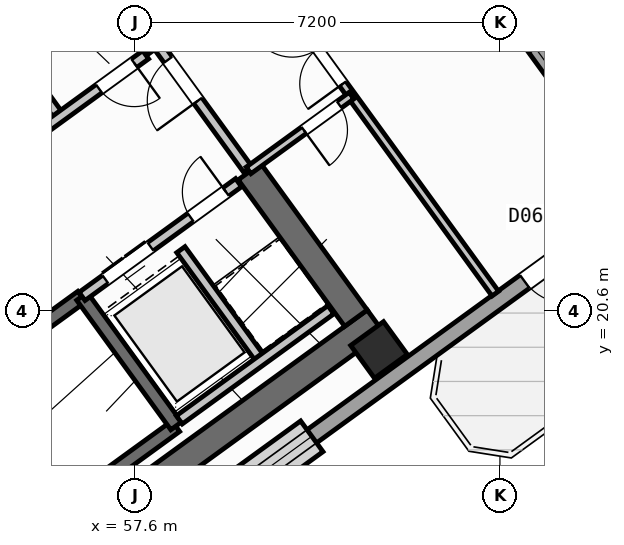
"""IFC4 building model, lengths in metres.
Left out: names, types, materials, properties, quantities, classifications, styles, units other than length and angle.
Written with IfcOpenShell. Run it as: python <this file> out.ifc"""

import sys

from ifc_helpers import new_model, si_unit, direction, frame, frame_2d, origin, origin_2d, place, context, subcontext, project, spatial, rectangle, hollow_rectangle, extrude, source, transform, mapped, element, fill, save


model = new_model("IFC4")
c1 = context("Model", 3, precision=1e-05, world=origin(), true_north=direction((0.0, 1.0)))
c2 = subcontext(c1, "Body", "Model", "MODEL_VIEW")
j1 = project(units=[si_unit("LENGTHUNIT", "METRE"), si_unit("PLANEANGLEUNIT", "RADIAN")], contexts=[c1])
p1 = place(None, origin())
s1 = spatial("IfcSite", under=j1, at=p1, CompositionType="ELEMENT")
p2 = place(p1, origin())
s2 = spatial("IfcBuilding", under=s1, at=p2, CompositionType="ELEMENT")
p3 = place(p2, frame((0.0, 0.0, 195.0)))
s3 = spatial("IfcBuildingStorey", under=s2, at=p3, CompositionType="ELEMENT", Elevation=195.0)
p4 = place(p3, frame((52.359, 13.14, 0.0), z_axis=(0.0, 0.0, 1.0), x_axis=(0.809014896919, 0.587788139183, 0.0)))
e1 = element("IfcWall", 1, at=p4, inside=s3, PredefinedType="SHEAR", context=c2, shape_type="SweptSolid", body=[
    extrude(rectangle(XDim=12.34, YDim=0.55, at=frame_2d((6.17, 0.0))), origin(), (0.0, 0.0, 1.0), 4.22),
])
p5 = place(p3, frame((61.958, 20.454, 0.0), z_axis=(0.0, 0.0, 1.0), x_axis=(-0.587802113096, 0.809004744015, 0.0)))
e2 = element("IfcWall", 2, at=p5, inside=s3, PredefinedType="SHEAR", context=c2, shape_type="SweptSolid", body=[
    extrude(rectangle(XDim=3.575, YDim=0.55, at=frame_2d((1.788, 0.0))), origin(), (0.0, 0.0, 1.0), 4.22),
])
p6 = place(p3, frame((58.064, 25.813, 0.0), z_axis=(0.0, 0.0, 1.0), x_axis=(-0.587764933797, 0.809031756236, 0.0)))
e3 = element("IfcWall", 3, at=p6, inside=s3, PredefinedType="SHEAR", context=c2, shape_type="SweptSolid", body=[
    extrude(rectangle(XDim=6.425, YDim=0.55, at=frame_2d((3.212, 0.0))), origin(), (0.0, 0.0, 1.0), 4.22),
])
m1 = source(origin(), c2, "Body", "SweptSolid", [
    extrude(hollow_rectangle(XDim=0.8, YDim=0.8, WallThickness=0.032, at=origin_2d()), origin(), (0.0, 0.0, 1.0), 4.5),
])
p7 = place(p3, frame((62.414, 19.827, 0.0), z_axis=(0.0, 0.0, 1.0), x_axis=(0.809016994375, 0.587785252292, 0.0)))
e4 = element("IfcColumn", 4, at=p7, inside=s3, PredefinedType="COLUMN", context=c2, shape_type="MappedRepresentation", body=[
    mapped(m1, transform((0.0, 0.0, 0.0), scale=1.0)),
])
p8 = place(p3, frame((54.81, 40.5, 0.0), z_axis=(0.0, 0.0, 1.0), x_axis=(0.587783625747, -0.809018176127, 0.0)))
e5 = element("IfcWall", 5, at=p8, inside=s3, PredefinedType="STANDARD", context=c2, shape_type="SweptSolid", body=[
    extrude(rectangle(XDim=21.587, YDim=0.32, at=frame_2d((10.794, 0.0))), origin(), (0.0, 0.0, 1.0), 3.695),
])
p9 = place(p8, frame((2.131, 0.0, 0.7)))
e6 = element("IfcOpeningElement", 6, at=p9, cuts=e5, PredefinedType="OPENING", context=c2, shape_type="SweptSolid", body=[
    extrude(rectangle(XDim=2.6, YDim=2.0, at=frame_2d((1.3, 1.0))), frame((0.0, 0.17, 0.0), z_axis=(0.0, -1.0, 0.0), x_axis=(1.0, 0.0, 0.0)), (0.0, 0.0, 1.0), 0.34),
])
p10 = place(p8, frame((9.244, 0.0, 0.75)))
e7 = element("IfcOpeningElement", 7, at=p10, cuts=e5, PredefinedType="OPENING", context=c2, shape_type="SweptSolid", body=[
    extrude(rectangle(XDim=2.0, YDim=1.95, at=frame_2d((1.0, 0.975))), frame((0.0, 0.17, 0.0), z_axis=(0.0, -1.0, 0.0), x_axis=(1.0, 0.0, 0.0)), (0.0, 0.0, 1.0), 0.34),
])
p11 = place(p8, frame((15.294, 0.0, 0.85)))
e8 = element("IfcOpeningElement", 8, at=p11, cuts=e5, PredefinedType="OPENING", context=c2, shape_type="SweptSolid", body=[
    extrude(rectangle(XDim=1.6, YDim=1.8, at=frame_2d((0.8, 0.9))), frame((0.0, 0.17, 0.0), z_axis=(0.0, -1.0, 0.0), x_axis=(1.0, 0.0, 0.0)), (0.0, 0.0, 1.0), 0.34),
])
p12 = place(p8, frame((18.194, 0.0, 0.85)))
e9 = element("IfcOpeningElement", 9, at=p12, cuts=e5, PredefinedType="OPENING", context=c2, shape_type="SweptSolid", body=[
    extrude(rectangle(XDim=1.6, YDim=1.8, at=frame_2d((0.8, 0.9))), frame((0.0, 0.17, 0.0), z_axis=(0.0, -1.0, 0.0), x_axis=(1.0, 0.0, 0.0)), (0.0, 0.0, 1.0), 0.34),
])
p13 = place(p3, frame((67.454, 22.747, 0.0), z_axis=(0.0, 0.0, 1.0), x_axis=(-0.809021120468, -0.587779573171, 0.0)))
e10 = element("IfcWall", 10, at=p13, inside=s3, PredefinedType="STANDARD", context=c2, shape_type="SweptSolid", body=[
    extrude(rectangle(XDim=17.588, YDim=0.32, at=frame_2d((8.794, 0.0))), origin(), (0.0, 0.0, 1.0), 4.22),
])
p14 = place(p13, frame((1.624, 0.0, 0.0)))
e11 = element("IfcOpeningElement", 11, at=p14, cuts=e10, PredefinedType="OPENING", context=c2, shape_type="SweptSolid", body=[
    extrude(rectangle(XDim=1.05, YDim=2.15, at=frame_2d((0.525, 1.075))), frame((0.0, 0.17, 0.0), z_axis=(0.0, -1.0, 0.0), x_axis=(1.0, 0.0, 0.0)), (0.0, 0.0, 1.0), 0.34),
])
p15 = place(p13, frame((7.869, 0.0, 0.7)))
e12 = element("IfcOpeningElement", 12, at=p15, cuts=e10, PredefinedType="OPENING", context=c2, shape_type="SweptSolid", body=[
    extrude(rectangle(XDim=2.6, YDim=2.0, at=frame_2d((1.3, 1.0))), frame((0.0, 0.17, 0.0), z_axis=(0.0, -1.0, 0.0), x_axis=(1.0, 0.0, 0.0)), (0.0, 0.0, 1.0), 0.34),
])
p16 = place(p13, frame((13.119, 0.0, 0.7)))
e13 = element("IfcOpeningElement", 13, at=p16, cuts=e10, PredefinedType="OPENING", context=c2, shape_type="SweptSolid", body=[
    extrude(rectangle(XDim=2.6, YDim=2.0, at=frame_2d((1.3, 1.0))), frame((0.0, 0.17, 0.0), z_axis=(0.0, -1.0, 0.0), x_axis=(1.0, 0.0, 0.0)), (0.0, 0.0, 1.0), 0.34),
])
p17 = place(p3, frame((49.863, 23.44, 0.0), z_axis=(0.0, 0.0, 1.0), x_axis=(0.809003474932, 0.587803859759, 0.0)))
e14 = element("IfcWall", 14, at=p17, inside=s3, PredefinedType="SHEAR", context=c2, shape_type="SweptSolid", body=[
    extrude(rectangle(XDim=7.46, YDim=0.26, at=frame_2d((3.73, 0.0))), origin(), (0.0, 0.0, 1.0), 4.22),
])
p18 = place(p17, frame((0.36, 0.0, 0.0)))
e15 = element("IfcOpeningElement", 15, at=p18, cuts=e14, PredefinedType="OPENING", context=c2, shape_type="SweptSolid", body=[
    extrude(rectangle(XDim=0.86, YDim=2.05, at=frame_2d((0.43, 1.025))), frame((0.0, 0.14, 0.0), z_axis=(0.0, -1.0, 0.0), x_axis=(1.0, 0.0, 0.0)), (0.0, 0.0, 1.0), 0.28),
])
p19 = place(p3, frame((52.472, 14.013, 0.0), z_axis=(0.0, 0.0, 1.0), x_axis=(0.809028366311, 0.587769599847, 0.0)))
e16 = element("IfcWall", 16, at=p19, inside=s3, PredefinedType="SHEAR", context=c2, shape_type="SweptSolid", body=[
    extrude(rectangle(XDim=7.33, YDim=0.26, at=frame_2d((3.665, 0.0))), origin(), (0.0, 0.0, 1.0), 4.22),
])
p20 = place(p3, frame((50.615, 16.57, 0.0), z_axis=(0.0, 0.0, 1.0), x_axis=(0.809028366311, 0.587769599847, 0.0)))
e17 = element("IfcWall", 17, at=p20, inside=s3, PredefinedType="SHEAR", context=c2, shape_type="SweptSolid", body=[
    extrude(rectangle(XDim=7.33, YDim=0.26, at=frame_2d((3.665, 0.0))), origin(), (0.0, 0.0, 1.0), 4.22),
])
p21 = place(p20, frame((0.22, 0.0, 0.0)))
e18 = element("IfcOpeningElement", 18, at=p21, cuts=e17, PredefinedType="OPENING", context=c2, shape_type="SweptSolid", body=[
    extrude(rectangle(XDim=1.1, YDim=2.1, at=frame_2d((0.55, 1.05))), frame((0.0, 0.14, 0.0), z_axis=(0.0, -1.0, 0.0), x_axis=(1.0, 0.0, 0.0)), (0.0, 0.0, 1.0), 0.28),
])
p22 = place(p3, frame((58.41, 18.327, 0.0), z_axis=(0.0, 0.0, 1.0), x_axis=(-0.58776738483, 0.809029975545, 0.0)))
e19 = element("IfcWall", 19, at=p22, inside=s3, PredefinedType="SHEAR", context=c2, shape_type="SweptSolid", body=[
    extrude(rectangle(XDim=3.16, YDim=0.26, at=frame_2d((1.58, 0.0))), origin(), (0.0, 0.0, 1.0), 4.22),
])
p23 = place(p3, frame((56.553, 20.884, 0.0), z_axis=(0.0, 0.0, 1.0), x_axis=(0.809023564264, 0.58777620951, 0.0)))
e20 = element("IfcWall", 20, at=p23, inside=s3, PredefinedType="STANDARD", context=c2, shape_type="SweptSolid", body=[
    extrude(rectangle(XDim=3.818, YDim=0.2, at=frame_2d((1.909, 0.0))), origin(), (0.0, 0.0, 1.0), 4.21),
])
p24 = place(p23, frame((0.57, 0.0, 0.0)))
e21 = element("IfcOpeningElement", 21, at=p24, cuts=e20, PredefinedType="OPENING", context=c2, shape_type="SweptSolid", body=[
    extrude(rectangle(XDim=1.1, YDim=2.15, at=frame_2d((0.55, 1.075))), frame((0.0, 0.11, 0.0), z_axis=(0.0, -1.0, 0.0), x_axis=(1.0, 0.0, 0.0)), (0.0, 0.0, 1.0), 0.22),
])
p25 = place(p23, frame((2.65, 0.0, 0.0)))
e22 = element("IfcOpeningElement", 22, at=p25, cuts=e20, PredefinedType="OPENING", context=c2, shape_type="SweptSolid", body=[
    extrude(rectangle(XDim=0.86, YDim=2.05, at=frame_2d((0.43, 1.025))), frame((0.0, 0.11, 0.0), z_axis=(0.0, -1.0, 0.0), x_axis=(1.0, 0.0, 0.0)), (0.0, 0.0, 1.0), 0.22),
])
p26 = place(p3, frame((60.067, 19.655, 0.0), z_axis=(0.0, 0.0, 1.0), x_axis=(-0.587800520745, 0.809005900975, 0.0)))
e23 = element("IfcWall", 23, at=p26, inside=s3, PredefinedType="STANDARD", context=c2, shape_type="SweptSolid", body=[
    extrude(rectangle(XDim=2.66, YDim=0.2, at=frame_2d((1.33, 0.0))), origin(), (0.0, 0.0, 1.0), 4.21),
])
p27 = place(p3, frame((58.472, 18.447, 0.0), z_axis=(0.0, 0.0, 1.0), x_axis=(0.809018631237, 0.587782999339, 0.0)))
e24 = element("IfcWall", 24, at=p27, inside=s3, PredefinedType="STANDARD", context=c2, shape_type="SweptSolid", body=[
    extrude(rectangle(XDim=3.698, YDim=0.2, at=frame_2d((1.849, 0.0))), origin(), (0.0, 0.0, 1.0), 4.21),
])
p28 = place(p3, frame((56.111, 24.419, 0.0), z_axis=(0.0, 0.0, 1.0), x_axis=(-0.58777848983, 0.809021907548, 0.0)))
e25 = element("IfcWall", 25, at=p28, inside=s3, PredefinedType="STANDARD", context=c2, shape_type="SweptSolid", body=[
    extrude(rectangle(XDim=2.88, YDim=0.2, at=frame_2d((1.44, 0.0))), origin(), (0.0, 0.0, 1.0), 4.21),
])
p29 = place(p3, frame((53.425, 22.468, 0.0), z_axis=(0.0, 0.0, 1.0), x_axis=(0.809024377198, 0.587775090574, 0.0)))
e26 = element("IfcWall", 26, at=p29, inside=s3, PredefinedType="STANDARD", context=c2, shape_type="SweptSolid", body=[
    extrude(rectangle(XDim=5.418, YDim=0.2, at=frame_2d((2.709, 0.0))), origin(), (0.0, 0.0, 1.0), 4.21),
])
p30 = place(p29, frame((4.28, 0.0, 0.0)))
e27 = element("IfcOpeningElement", 27, at=p30, cuts=e26, PredefinedType="OPENING", context=c2, shape_type="SweptSolid", body=[
    extrude(rectangle(XDim=0.86, YDim=2.05, at=frame_2d((0.43, 1.025))), frame((0.0, 0.11, 0.0), z_axis=(0.0, -1.0, 0.0), x_axis=(1.0, 0.0, 0.0)), (0.0, 0.0, 1.0), 0.22),
])
p31 = place(p29, frame((0.35, 0.0, 0.0)))
e28 = element("IfcOpeningElement", 28, at=p31, cuts=e26, PredefinedType="OPENING", context=c2, shape_type="SweptSolid", body=[
    extrude(rectangle(XDim=0.86, YDim=2.05, at=frame_2d((0.43, 1.025))), frame((0.0, 0.11, 0.0), z_axis=(0.0, -1.0, 0.0), x_axis=(1.0, 0.0, 0.0)), (0.0, 0.0, 1.0), 0.22),
])
p32 = place(p3, frame((59.827, 23.386, 0.0), z_axis=(0.0, 0.0, 1.0), x_axis=(-0.587803840107, 0.809003489211, 0.0)))
e29 = element("IfcWall", 29, at=p32, inside=s3, PredefinedType="STANDARD", context=c2, shape_type="SweptSolid", body=[
    extrude(rectangle(XDim=2.96, YDim=0.2, at=frame_2d((1.48, 0.0))), origin(), (0.0, 0.0, 1.0), 4.21),
])
p33 = place(p32, frame((1.68, 0.0, 0.0)))
e30 = element("IfcOpeningElement", 30, at=p33, cuts=e29, PredefinedType="OPENING", context=c2, shape_type="SweptSolid", body=[
    extrude(rectangle(XDim=1.0, YDim=2.1, at=frame_2d((0.5, 1.05))), frame((0.0, 0.11, 0.0), z_axis=(0.0, -1.0, 0.0), x_axis=(1.0, 0.0, 0.0)), (0.0, 0.0, 1.0), 0.22),
])
p34 = place(p3, frame((64.709, 20.938, 0.0), z_axis=(0.0, 0.0, 1.0), x_axis=(-0.58777828151, 0.809022058899, 0.0)))
e31 = element("IfcWall", 31, at=p34, inside=s3, PredefinedType="PARTITIONING", context=c2, shape_type="SweptSolid", body=[
    extrude(rectangle(XDim=21.7, YDim=0.16, at=frame_2d((10.85, 0.0))), origin(), (0.0, 0.0, 1.0), 4.21),
])
p35 = place(p34, frame((5.12, 0.0, 0.0)))
e32 = element("IfcOpeningElement", 32, at=p35, cuts=e31, PredefinedType="OPENING", context=c2, shape_type="SweptSolid", body=[
    extrude(rectangle(XDim=1.7, YDim=2.2, at=frame_2d((0.85, 1.1))), frame((0.0, 0.09, 0.0), z_axis=(0.0, -1.0, 0.0), x_axis=(1.0, 0.0, 0.0)), (0.0, 0.0, 1.0), 0.18),
])
p36 = place(p3, frame((59.839, 23.37, 0.0), z_axis=(0.0, 0.0, 1.0), x_axis=(0.809000999347, 0.58780726693, 0.0)))
e33 = element("IfcWall", 33, at=p36, inside=s3, PredefinedType="PARTITIONING", context=c2, shape_type="SweptSolid", body=[
    extrude(rectangle(XDim=2.51, YDim=0.16, at=frame_2d((1.255, 0.0))), origin(), (0.0, 0.0, 1.0), 4.21),
])
p37 = place(p36, frame((1.35, 0.0, 0.0)))
e34 = element("IfcOpeningElement", 34, at=p37, cuts=e33, PredefinedType="OPENING", context=c2, shape_type="SweptSolid", body=[
    extrude(rectangle(XDim=0.86, YDim=2.05, at=frame_2d((0.43, 1.025))), frame((0.0, 0.09, 0.0), z_axis=(0.0, -1.0, 0.0), x_axis=(1.0, 0.0, 0.0)), (0.0, 0.0, 1.0), 0.18),
])
m2 = source(origin(), c2, "Body", "SweptSolid", [
    extrude(rectangle(XDim=1.05, YDim=2.15, at=frame_2d((0.525, 1.075))), frame((0.0, 0.025, 0.0), z_axis=(0.0, -1.0, 0.0), x_axis=(1.0, 0.0, 0.0)), (0.0, 0.0, 1.0), 0.05),
])
p38 = place(p14, origin())
e35 = element("IfcDoor", 35, at=p38, inside=s3, OperationType="SINGLE_SWING_LEFT", PredefinedType="DOOR", context=c2, shape_type="MappedRepresentation", body=[
    mapped(m2, transform((0.0, 0.0, 0.0), scale=1.0)),
])
fill(e11, e35)
m3 = source(origin(), c2, "Body", "SweptSolid", [
    extrude(rectangle(XDim=1.6, YDim=1.8, at=frame_2d((0.8, 0.9))), frame((0.0, 0.03, 0.0), z_axis=(0.0, -1.0, 0.0), x_axis=(1.0, 0.0, 0.0)), (0.0, 0.0, 1.0), 0.06),
])
p39 = place(p12, origin())
e36 = element("IfcWindow", 36, at=p39, inside=s3, PartitioningType="SINGLE_PANEL", PredefinedType="WINDOW", context=c2, shape_type="MappedRepresentation", body=[
    mapped(m3, transform((0.0, 0.0, 0.0), scale=1.0)),
])
fill(e9, e36)
m4 = source(origin(), c2, "Body", "SweptSolid", [
    extrude(rectangle(XDim=2.6, YDim=2.0, at=frame_2d((1.3, 1.0))), frame((0.0, 0.03, 0.0), z_axis=(0.0, -1.0, 0.0), x_axis=(1.0, 0.0, 0.0)), (0.0, 0.0, 1.0), 0.06),
])
p40 = place(p15, origin())
e37 = element("IfcWindow", 37, at=p40, inside=s3, PartitioningType="SINGLE_PANEL", PredefinedType="WINDOW", context=c2, shape_type="MappedRepresentation", body=[
    mapped(m4, transform((0.0, 0.0, 0.0), scale=1.0)),
])
fill(e12, e37)
m5 = source(origin(), c2, "Body", "SweptSolid", [
    extrude(rectangle(XDim=1.1, YDim=2.15, at=frame_2d((0.55, 1.075))), frame((0.0, 0.025, 0.0), z_axis=(0.0, -1.0, 0.0), x_axis=(1.0, 0.0, 0.0)), (0.0, 0.0, 1.0), 0.05),
])
p41 = place(p24, origin())
e38 = element("IfcDoor", 38, at=p41, inside=s3, OperationType="DOUBLE_DOOR_SLIDING", PredefinedType="DOOR", context=c2, shape_type="MappedRepresentation", body=[
    mapped(m5, transform((0.0, 0.0, 0.0), scale=1.0)),
])
fill(e21, e38)
m6 = source(origin(), c2, "Body", "SweptSolid", [
    extrude(rectangle(XDim=0.86, YDim=2.05, at=frame_2d((0.43, 1.025))), frame((0.0, 0.025, 0.0), z_axis=(0.0, -1.0, 0.0), x_axis=(1.0, 0.0, 0.0)), (0.0, 0.0, 1.0), 0.05),
])
p42 = place(p25, origin())
e39 = element("IfcDoor", 39, at=p42, inside=s3, OperationType="SINGLE_SWING_RIGHT", PredefinedType="DOOR", context=c2, shape_type="MappedRepresentation", body=[
    mapped(m6, transform((0.0, 0.0, 0.0), scale=1.0)),
])
fill(e22, e39)
p43 = place(p30, frame((0.86, 0.0, 0.0), z_axis=(0.0, 0.0, 1.0), x_axis=(-1.0, 0.0, 0.0)))
e40 = element("IfcDoor", 40, at=p43, inside=s3, OperationType="SINGLE_SWING_LEFT", PredefinedType="DOOR", context=c2, shape_type="MappedRepresentation", body=[
    mapped(m6, transform((0.0, 0.0, 0.0), scale=1.0)),
])
fill(e27, e40)
p44 = place(p37, frame((0.86, 0.0, 0.0), z_axis=(0.0, 0.0, 1.0), x_axis=(-1.0, 0.0, 0.0)))
e41 = element("IfcDoor", 41, at=p44, inside=s3, OperationType="SINGLE_SWING_RIGHT", PredefinedType="DOOR", context=c2, shape_type="MappedRepresentation", body=[
    mapped(m6, transform((0.0, 0.0, 0.0), scale=1.0)),
])
fill(e34, e41)
m7 = source(origin(), c2, "Body", "SweptSolid", [
    extrude(rectangle(XDim=1.0, YDim=2.1, at=frame_2d((0.5, 1.05))), frame((0.0, 0.025, 0.0), z_axis=(0.0, -1.0, 0.0), x_axis=(1.0, 0.0, 0.0)), (0.0, 0.0, 1.0), 0.05),
])
p45 = place(p33, origin())
e42 = element("IfcDoor", 42, at=p45, inside=s3, OperationType="SINGLE_SWING_LEFT", PredefinedType="DOOR", context=c2, shape_type="MappedRepresentation", body=[
    mapped(m7, transform((0.0, 0.0, 0.0), scale=1.0)),
])
fill(e30, e42)
m8 = source(origin(), c2, "Body", "SweptSolid", [
    extrude(rectangle(XDim=1.7, YDim=2.2, at=frame_2d((0.85, 1.1))), frame((0.0, 0.025, 0.0), z_axis=(0.0, -1.0, 0.0), x_axis=(1.0, 0.0, 0.0)), (0.0, 0.0, 1.0), 0.05),
])
p46 = place(p35, origin())
e43 = element("IfcDoor", 43, at=p46, inside=s3, OperationType="DOUBLE_DOOR_SINGLE_SWING", PredefinedType="DOOR", context=c2, shape_type="MappedRepresentation", body=[
    mapped(m8, transform((0.0, 0.0, 0.0), scale=1.0)),
])
fill(e32, e43)
save(model, sys.argv[1])
